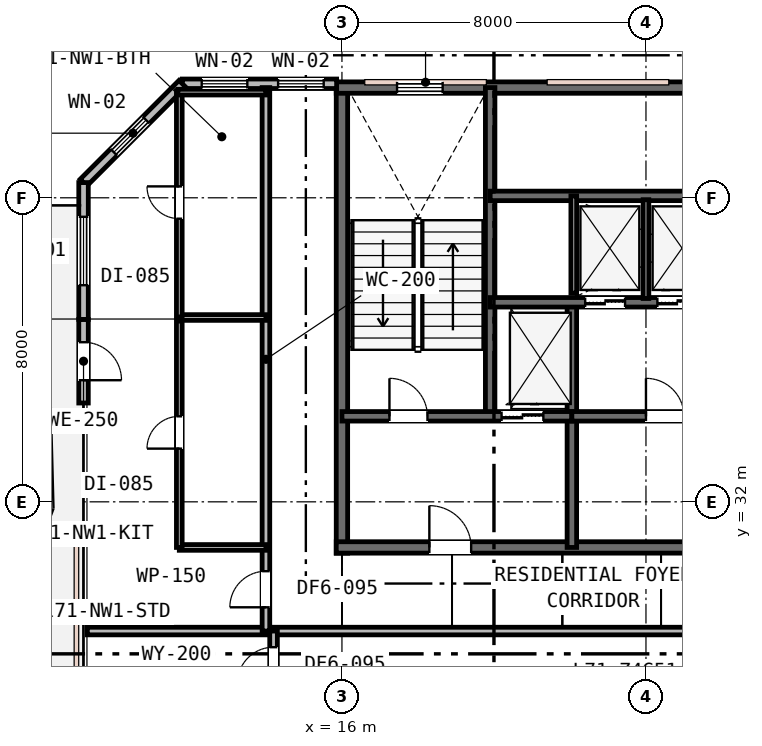
"""IFC4 building model, lengths in metres.
Left out: names, types, materials, properties, quantities, classifications, styles, units other than length and angle.
Written with IfcOpenShell. Run it as: python <this file> out.ifc"""

import sys

from ifc_helpers import new_model, si_unit, direction, frame, frame_2d, origin, place, context, subcontext, project, spatial, rectangle, extrude, element, fill, save


model = new_model("IFC4")
c1 = context("Model", 3, precision=1e-05, world=origin(), true_north=direction((0.0, 1.0)))
c2 = subcontext(c1, "Body", "Model", "MODEL_VIEW")
j1 = project(units=[si_unit("LENGTHUNIT", "METRE"), si_unit("PLANEANGLEUNIT", "RADIAN")], contexts=[c1])
p1 = place(None, origin())
s1 = spatial("IfcSite", under=j1, at=p1, CompositionType="ELEMENT")
p2 = place(p1, origin())
s2 = spatial("IfcBuilding", under=s1, at=p2, CompositionType="ELEMENT")
p3 = place(p2, frame((0.0, 0.0, 275.4)))
s3 = spatial("IfcBuildingStorey", under=s2, at=p3, CompositionType="ELEMENT", Elevation=275.4)
p4 = place(p3, frame((16.0, 30.65, 0.0), z_axis=(0.0, 0.0, 1.0), x_axis=(0.0, 1.0, 0.0)))
e1 = element("IfcWall", 1, at=p4, inside=s3, PredefinedType="SHEAR", context=c2, shape_type="SweptSolid", body=[
    extrude(rectangle(XDim=12.3, YDim=0.3, at=frame_2d((6.15, 0.0))), origin(), (0.0, 0.0, 1.0), 3.8),
])
p5 = place(p3, frame((15.85, 42.9, 0.0), z_axis=(0.0, 0.0, 1.0), x_axis=(1.0, 0.0, 0.0)))
e2 = element("IfcWall", 2, at=p5, inside=s3, PredefinedType="SHEAR", context=c2, shape_type="SweptSolid", body=[
    extrude(rectangle(XDim=24.3, YDim=0.3, at=frame_2d((12.15, 0.0))), origin(), (0.0, 0.0, 1.0), 3.8),
])
p6 = place(p5, frame((1.6, 0.0, 0.95)))
e3 = element("IfcOpeningElement", 3, at=p6, cuts=e2, PredefinedType="OPENING", context=c2, shape_type="SweptSolid", body=[
    extrude(rectangle(XDim=1.2, YDim=1.6, at=frame_2d((0.6, 0.8))), frame((0.0, 0.16, 0.0), z_axis=(0.0, -1.0, 0.0), x_axis=(1.0, 0.0, 0.0)), (0.0, 0.0, 1.0), 0.32),
])
p7 = place(p5, frame((16.5, 0.0, 0.95)))
e4 = element("IfcOpeningElement", 4, at=p7, cuts=e2, PredefinedType="OPENING", context=c2, shape_type="SweptSolid", body=[
    extrude(rectangle(XDim=1.2, YDim=1.6, at=frame_2d((0.6, 0.8))), frame((0.0, 0.16, 0.0), z_axis=(0.0, -1.0, 0.0), x_axis=(1.0, 0.0, 0.0)), (0.0, 0.0, 1.0), 0.32),
])
p8 = place(p5, frame((21.6, 0.0, 0.95)))
e5 = element("IfcOpeningElement", 5, at=p8, cuts=e2, PredefinedType="OPENING", context=c2, shape_type="SweptSolid", body=[
    extrude(rectangle(XDim=1.2, YDim=1.6, at=frame_2d((0.6, 0.8))), frame((0.0, 0.16, 0.0), z_axis=(0.0, -1.0, 0.0), x_axis=(1.0, 0.0, 0.0)), (0.0, 0.0, 1.0), 0.32),
])
p9 = place(p3, frame((15.85, 30.8, 0.0), z_axis=(0.0, 0.0, 1.0), x_axis=(1.0, 0.0, 0.0)))
e6 = element("IfcWall", 6, at=p9, inside=s3, PredefinedType="SHEAR", context=c2, shape_type="SweptSolid", body=[
    extrude(rectangle(XDim=11.2, YDim=0.3, at=frame_2d((5.6, 0.0))), origin(), (0.0, 0.0, 1.0), 3.8),
])
p10 = place(p9, frame((2.45, 0.0, 0.0)))
e7 = element("IfcOpeningElement", 7, at=p10, cuts=e6, PredefinedType="OPENING", context=c2, shape_type="SweptSolid", body=[
    extrude(rectangle(XDim=1.1, YDim=2.15, at=frame_2d((0.55, 1.075))), frame((0.0, 0.16, 0.0), z_axis=(0.0, -1.0, 0.0), x_axis=(1.0, 0.0, 0.0)), (0.0, 0.0, 1.0), 0.32),
])
p11 = place(p3, frame((19.9, 34.25, 0.0), z_axis=(0.0, 0.0, 1.0), x_axis=(0.0, 1.0, 0.0)))
e8 = element("IfcWall", 8, at=p11, inside=s3, PredefinedType="SHEAR", context=c2, shape_type="SweptSolid", body=[
    extrude(rectangle(XDim=8.65, YDim=0.25, at=frame_2d((4.325, 0.0))), origin(), (0.0, 0.0, 1.0), 3.8),
])
p12 = place(p3, frame((22.05, 30.8, 0.0), z_axis=(0.0, 0.0, 1.0), x_axis=(0.0, 1.0, 0.0)))
e9 = element("IfcWall", 9, at=p12, inside=s3, PredefinedType="SHEAR", context=c2, shape_type="SweptSolid", body=[
    extrude(rectangle(XDim=6.45, YDim=0.25, at=frame_2d((3.225, 0.0))), origin(), (0.0, 0.0, 1.0), 3.8),
])
p13 = place(p3, frame((16.0, 34.25, 0.0), z_axis=(0.0, 0.0, 1.0), x_axis=(1.0, 0.0, 0.0)))
e10 = element("IfcWall", 10, at=p13, inside=s3, PredefinedType="SHEAR", context=c2, shape_type="SweptSolid", body=[
    extrude(rectangle(XDim=6.05, YDim=0.25, at=frame_2d((3.025, 0.0))), origin(), (0.0, 0.0, 1.0), 3.8),
])
p14 = place(p13, frame((1.25, 0.0, 0.0)))
e11 = element("IfcOpeningElement", 11, at=p14, cuts=e10, PredefinedType="OPENING", context=c2, shape_type="SweptSolid", body=[
    extrude(rectangle(XDim=1.0, YDim=2.15, at=frame_2d((0.5, 1.075))), frame((0.0, 0.135, 0.0), z_axis=(0.0, -1.0, 0.0), x_axis=(1.0, 0.0, 0.0)), (0.0, 0.0, 1.0), 0.27),
])
p15 = place(p13, frame((4.2, 0.0, 0.0)))
e12 = element("IfcOpeningElement", 12, at=p15, cuts=e10, PredefinedType="OPENING", context=c2, shape_type="SweptSolid", body=[
    extrude(rectangle(XDim=1.1, YDim=2.15, at=frame_2d((0.55, 1.075))), frame((0.0, 0.135, 0.0), z_axis=(0.0, -1.0, 0.0), x_axis=(1.0, 0.0, 0.0)), (0.0, 0.0, 1.0), 0.27),
])
p16 = place(p3, frame((22.05, 34.25, 0.0), z_axis=(0.0, 0.0, 1.0), x_axis=(1.0, 0.0, 0.0)))
e13 = element("IfcWall", 13, at=p16, inside=s3, PredefinedType="SHEAR", context=c2, shape_type="SweptSolid", body=[
    extrude(rectangle(XDim=5.0, YDim=0.25, at=frame_2d((2.5, 0.0))), origin(), (0.0, 0.0, 1.0), 3.8),
])
p17 = place(p16, frame((1.95, 0.0, 0.0)))
e14 = element("IfcOpeningElement", 14, at=p17, cuts=e13, PredefinedType="OPENING", context=c2, shape_type="SweptSolid", body=[
    extrude(rectangle(XDim=1.0, YDim=2.15, at=frame_2d((0.5, 1.075))), frame((0.0, 0.135, 0.0), z_axis=(0.0, -1.0, 0.0), x_axis=(1.0, 0.0, 0.0)), (0.0, 0.0, 1.0), 0.27),
])
p18 = place(p3, frame((19.9, 37.25, 0.0), z_axis=(0.0, 0.0, 1.0), x_axis=(1.0, 0.0, 0.0)))
e15 = element("IfcWall", 15, at=p18, inside=s3, PredefinedType="SHEAR", context=c2, shape_type="SweptSolid", body=[
    extrude(rectangle(XDim=16.2, YDim=0.25, at=frame_2d((8.1, 0.0))), origin(), (0.0, 0.0, 1.0), 3.8),
])
p19 = place(p18, frame((12.55, 0.0, 0.0)))
e16 = element("IfcOpeningElement", 16, at=p19, cuts=e15, PredefinedType="OPENING", context=c2, shape_type="SweptSolid", body=[
    extrude(rectangle(XDim=0.9, YDim=2.15, at=frame_2d((0.45, 1.075))), frame((0.0, 0.135, 0.0), z_axis=(0.0, -1.0, 0.0), x_axis=(1.0, 0.0, 0.0)), (0.0, 0.0, 1.0), 0.27),
])
p20 = place(p18, frame((2.5, 0.0, 0.0)))
e17 = element("IfcOpeningElement", 17, at=p20, cuts=e15, PredefinedType="OPENING", context=c2, shape_type="SweptSolid", body=[
    extrude(rectangle(XDim=1.05, YDim=2.15, at=frame_2d((0.525, 1.075))), frame((0.0, 0.135, 0.0), z_axis=(0.0, -1.0, 0.0), x_axis=(1.0, 0.0, 0.0)), (0.0, 0.0, 1.0), 0.27),
])
p21 = place(p18, frame((4.4, 0.0, 0.0)))
e18 = element("IfcOpeningElement", 18, at=p21, cuts=e15, PredefinedType="OPENING", context=c2, shape_type="SweptSolid", body=[
    extrude(rectangle(XDim=1.05, YDim=2.15, at=frame_2d((0.525, 1.075))), frame((0.0, 0.135, 0.0), z_axis=(0.0, -1.0, 0.0), x_axis=(1.0, 0.0, 0.0)), (0.0, 0.0, 1.0), 0.27),
])
p22 = place(p18, frame((6.3, 0.0, 0.0)))
e19 = element("IfcOpeningElement", 19, at=p22, cuts=e15, PredefinedType="OPENING", context=c2, shape_type="SweptSolid", body=[
    extrude(rectangle(XDim=1.05, YDim=2.15, at=frame_2d((0.525, 1.075))), frame((0.0, 0.135, 0.0), z_axis=(0.0, -1.0, 0.0), x_axis=(1.0, 0.0, 0.0)), (0.0, 0.0, 1.0), 0.27),
])
p23 = place(p3, frame((19.9, 40.05, 0.0), z_axis=(0.0, 0.0, 1.0), x_axis=(1.0, 0.0, 0.0)))
e20 = element("IfcWall", 20, at=p23, inside=s3, PredefinedType="SHEAR", context=c2, shape_type="SweptSolid", body=[
    extrude(rectangle(XDim=12.05, YDim=0.25, at=frame_2d((6.025, 0.0))), origin(), (0.0, 0.0, 1.0), 3.8),
])
p24 = place(p3, frame((15.86, 43.0, 0.0), z_axis=(0.0, 0.0, 1.0), x_axis=(-1.0, 0.0, 0.0)))
e21 = element("IfcWall", 21, at=p24, inside=s3, PredefinedType="STANDARD", context=c2, shape_type="SweptSolid", body=[
    extrude(rectangle(XDim=4.06, YDim=0.25, at=frame_2d((2.03, 0.0))), origin(), (0.0, 0.0, 1.0), 3.53),
])
p25 = place(p24, frame((0.34, 0.0, 0.85)))
e22 = element("IfcOpeningElement", 22, at=p25, cuts=e21, PredefinedType="OPENING", context=c2, shape_type="SweptSolid", body=[
    extrude(rectangle(XDim=1.2, YDim=1.6, at=frame_2d((0.6, 0.8))), frame((0.0, 0.135, 0.0), z_axis=(0.0, -1.0, 0.0), x_axis=(1.0, 0.0, 0.0)), (0.0, 0.0, 1.0), 0.27),
])
p26 = place(p24, frame((2.35, 0.0, 0.85)))
e23 = element("IfcOpeningElement", 23, at=p26, cuts=e21, PredefinedType="OPENING", context=c2, shape_type="SweptSolid", body=[
    extrude(rectangle(XDim=1.2, YDim=1.6, at=frame_2d((0.6, 0.8))), frame((0.0, 0.135, 0.0), z_axis=(0.0, -1.0, 0.0), x_axis=(1.0, 0.0, 0.0)), (0.0, 0.0, 1.0), 0.27),
])
p27 = place(p3, frame((11.8, 43.0, 0.0), z_axis=(0.0, 0.0, 1.0), x_axis=(-0.707106781187, -0.707106781187, 0.0)))
e24 = element("IfcWall", 24, at=p27, inside=s3, PredefinedType="STANDARD", context=c2, shape_type="SweptSolid", body=[
    extrude(rectangle(XDim=3.677, YDim=0.25, at=frame_2d((1.839, 0.0))), origin(), (0.0, 0.0, 1.0), 3.53),
])
p28 = place(p27, frame((1.349, 0.0, 0.85)))
e25 = element("IfcOpeningElement", 25, at=p28, cuts=e24, PredefinedType="OPENING", context=c2, shape_type="SweptSolid", body=[
    extrude(rectangle(XDim=1.2, YDim=1.6, at=frame_2d((0.6, 0.8))), frame((0.0, 0.135, 0.0), z_axis=(0.0, -1.0, 0.0), x_axis=(1.0, 0.0, 0.0)), (0.0, 0.0, 1.0), 0.27),
])
p29 = place(p3, frame((9.2, 36.8, 0.0), z_axis=(0.0, 0.0, 1.0), x_axis=(0.0, -1.0, 0.0)))
e26 = element("IfcWall", 26, at=p29, inside=s3, PredefinedType="STANDARD", context=c2, shape_type="SweptSolid", body=[
    extrude(rectangle(XDim=2.2, YDim=0.25, at=frame_2d((1.1, 0.0))), origin(), (0.0, 0.0, 1.0), 3.53),
])
p30 = place(p29, frame((0.6, 0.0, 0.0)))
e27 = element("IfcOpeningElement", 27, at=p30, cuts=e26, PredefinedType="OPENING", context=c2, shape_type="SweptSolid", body=[
    extrude(rectangle(XDim=1.0, YDim=2.15, at=frame_2d((0.5, 1.075))), frame((0.0, 0.135, 0.0), z_axis=(0.0, -1.0, 0.0), x_axis=(1.0, 0.0, 0.0)), (0.0, 0.0, 1.0), 0.27),
])
p31 = place(p3, frame((9.2, 40.4, 0.0), z_axis=(0.0, 0.0, 1.0), x_axis=(0.0, -1.0, 0.0)))
e28 = element("IfcWall", 28, at=p31, inside=s3, PredefinedType="STANDARD", context=c2, shape_type="SweptSolid", body=[
    extrude(rectangle(XDim=3.6, YDim=0.25, at=frame_2d((1.8, 0.0))), origin(), (0.0, 0.0, 1.0), 3.53),
])
p32 = place(p31, frame((0.9, 0.0, 0.75)))
e29 = element("IfcOpeningElement", 29, at=p32, cuts=e28, PredefinedType="OPENING", context=c2, shape_type="SweptSolid", body=[
    extrude(rectangle(XDim=1.8, YDim=1.85, at=frame_2d((0.9, 0.925))), frame((0.0, 0.135, 0.0), z_axis=(0.0, -1.0, 0.0), x_axis=(1.0, 0.0, 0.0)), (0.0, 0.0, 1.0), 0.27),
])
p33 = place(p3, frame((22.1, 37.49, 0.0), z_axis=(0.0, 0.0, 1.0), x_axis=(0.0, 1.0, 0.0)))
e30 = element("IfcWall", 30, at=p33, inside=s3, PredefinedType="PLUMBINGWALL", context=c2, shape_type="SweptSolid", body=[
    extrude(rectangle(XDim=2.56, YDim=0.15, at=frame_2d((1.28, 0.0))), origin(), (0.0, 0.0, 1.0), 3.53),
])
p34 = place(p3, frame((24.0, 37.35, 0.0), z_axis=(0.0, 0.0, 1.0), x_axis=(0.0, 1.0, 0.0)))
e31 = element("IfcWall", 31, at=p34, inside=s3, PredefinedType="PLUMBINGWALL", context=c2, shape_type="SweptSolid", body=[
    extrude(rectangle(XDim=2.6, YDim=0.15, at=frame_2d((1.3, 0.0))), origin(), (0.0, 0.0, 1.0), 3.53),
])
p35 = place(p3, frame((9.3, 28.6, 0.0), z_axis=(0.0, 0.0, 1.0), x_axis=(1.0, 0.0, 0.0)))
e32 = element("IfcWall", 32, at=p35, inside=s3, PredefinedType="PARTITIONING", context=c2, shape_type="SweptSolid", body=[
    extrude(rectangle(XDim=4.7, YDim=0.2, at=frame_2d((2.35, 0.0))), origin(), (0.0, 0.0, 1.0), 3.53),
])
p36 = place(p3, frame((14.2, 28.6, 0.0), z_axis=(0.0, 0.0, 1.0), x_axis=(1.0, 0.0, 0.0)))
e33 = element("IfcWall", 33, at=p36, inside=s3, PredefinedType="PARTITIONING", context=c2, shape_type="SweptSolid", body=[
    extrude(rectangle(XDim=31.7, YDim=0.2, at=frame_2d((15.85, 0.0))), origin(), (0.0, 0.0, 1.0), 3.16),
])
p37 = place(p36, frame((12.625, 0.0, 0.0)))
e34 = element("IfcOpeningElement", 34, at=p37, cuts=e33, PredefinedType="OPENING", context=c2, shape_type="SweptSolid", body=[
    extrude(rectangle(XDim=0.95, YDim=2.15, at=frame_2d((0.475, 1.075))), frame((0.0, 0.11, 0.0), z_axis=(0.0, -1.0, 0.0), x_axis=(1.0, 0.0, 0.0)), (0.0, 0.0, 1.0), 0.22),
])
p38 = place(p36, frame((19.125, 0.0, 0.0)))
e35 = element("IfcOpeningElement", 35, at=p38, cuts=e33, PredefinedType="OPENING", context=c2, shape_type="SweptSolid", body=[
    extrude(rectangle(XDim=0.95, YDim=2.15, at=frame_2d((0.475, 1.075))), frame((0.0, 0.11, 0.0), z_axis=(0.0, -1.0, 0.0), x_axis=(1.0, 0.0, 0.0)), (0.0, 0.0, 1.0), 0.22),
])
p39 = place(p36, frame((24.016, 0.0, 0.0)))
e36 = element("IfcOpeningElement", 36, at=p39, cuts=e33, PredefinedType="OPENING", context=c2, shape_type="SweptSolid", body=[
    extrude(rectangle(XDim=0.95, YDim=2.15, at=frame_2d((0.475, 1.075))), frame((0.0, 0.11, 0.0), z_axis=(0.0, -1.0, 0.0), x_axis=(1.0, 0.0, 0.0)), (0.0, 0.0, 1.0), 0.22),
])
p40 = place(p3, frame((14.0, 28.6, 0.0), z_axis=(0.0, 0.0, 1.0), x_axis=(0.0, 1.0, 0.0)))
e37 = element("IfcWall", 37, at=p40, inside=s3, PredefinedType="PARTITIONING", context=c2, shape_type="SweptSolid", body=[
    extrude(rectangle(XDim=14.3, YDim=0.2, at=frame_2d((7.15, 0.0))), origin(), (0.0, 0.0, 1.0), 3.53),
])
p41 = place(p40, frame((0.625, 0.0, 0.0)))
e38 = element("IfcOpeningElement", 38, at=p41, cuts=e37, PredefinedType="OPENING", context=c2, shape_type="SweptSolid", body=[
    extrude(rectangle(XDim=0.95, YDim=2.15, at=frame_2d((0.475, 1.075))), frame((0.0, 0.11, 0.0), z_axis=(0.0, -1.0, 0.0), x_axis=(1.0, 0.0, 0.0)), (0.0, 0.0, 1.0), 0.22),
])
for number, where, z_axis, x_axis in (
    (39, (11.72, 30.8, 0.0), (0.0, 0.0, 1.0), (1.0, 0.0, 0.0)),
    (40, (11.72, 36.85, 0.0), (0.0, 0.0, 1.0), (1.0, 0.0, 0.0)),
):
    element("IfcWall", number, at=place(p3, frame(where, z_axis=z_axis, x_axis=x_axis)), inside=s3, PredefinedType="PARTITIONING", context=c2, shape_type="SweptSolid", body=[
        extrude(rectangle(XDim=2.28, YDim=0.15, at=frame_2d((1.14, 0.0))), origin(), (0.0, 0.0, 1.0), 3.53),
    ])
p42 = place(p3, frame((11.72, 30.8, 0.0), z_axis=(0.0, 0.0, 1.0), x_axis=(0.0, 1.0, 0.0)))
e41 = element("IfcWall", 41, at=p42, inside=s3, PredefinedType="PARTITIONING", context=c2, shape_type="SweptSolid", body=[
    extrude(rectangle(XDim=12.02, YDim=0.15, at=frame_2d((6.01, 0.0))), origin(), (0.0, 0.0, 1.0), 3.53),
])
p43 = place(p42, frame((2.6, 0.0, 0.0)))
e42 = element("IfcOpeningElement", 42, at=p43, cuts=e41, PredefinedType="OPENING", context=c2, shape_type="SweptSolid", body=[
    extrude(rectangle(XDim=0.85, YDim=2.15, at=frame_2d((0.425, 1.075))), frame((0.0, 0.085, 0.0), z_axis=(0.0, -1.0, 0.0), x_axis=(1.0, 0.0, 0.0)), (0.0, 0.0, 1.0), 0.17),
])
p44 = place(p42, frame((8.65, 0.0, 0.0)))
e43 = element("IfcOpeningElement", 43, at=p44, cuts=e41, PredefinedType="OPENING", context=c2, shape_type="SweptSolid", body=[
    extrude(rectangle(XDim=0.85, YDim=2.15, at=frame_2d((0.425, 1.075))), frame((0.0, 0.085, 0.0), z_axis=(0.0, -1.0, 0.0), x_axis=(1.0, 0.0, 0.0)), (0.0, 0.0, 1.0), 0.17),
])
p45 = place(p3, frame((11.68, 42.78, 0.0), z_axis=(0.0, 0.0, 1.0), x_axis=(1.0, 0.0, 0.0)))
e44 = element("IfcWall", 44, at=p45, inside=s3, PredefinedType="PARTITIONING", context=c2, shape_type="SweptSolid", body=[
    extrude(rectangle(XDim=2.32, YDim=0.15, at=frame_2d((1.16, 0.0))), origin(), (0.0, 0.0, 1.0), 3.53),
])
p46 = place(p3, frame((14.2, 17.0, 0.0), z_axis=(0.0, 0.0, 1.0), x_axis=(0.0, 1.0, 0.0)))
e45 = element("IfcWall", 45, at=p46, inside=s3, PredefinedType="PARTITIONING", context=c2, shape_type="SweptSolid", body=[
    extrude(rectangle(XDim=11.6, YDim=0.2, at=frame_2d((5.8, 0.0))), origin(), (0.0, 0.0, 1.0), 3.53),
])
p47 = place(p46, frame((10.225, 0.0, 0.0)))
e46 = element("IfcOpeningElement", 46, at=p47, cuts=e45, PredefinedType="OPENING", context=c2, shape_type="SweptSolid", body=[
    extrude(rectangle(XDim=0.95, YDim=2.15, at=frame_2d((0.475, 1.075))), frame((0.0, 0.11, 0.0), z_axis=(0.0, -1.0, 0.0), x_axis=(1.0, 0.0, 0.0)), (0.0, 0.0, 1.0), 0.22),
])
p48 = place(p6, origin())
e47 = element("IfcWindow", 47, at=p48, inside=s3, PartitioningType="SINGLE_PANEL", PredefinedType="WINDOW", context=c2, shape_type="SweptSolid", body=[
    extrude(rectangle(XDim=1.2, YDim=1.6, at=frame_2d((0.6, 0.8))), frame((0.0, 0.03, 0.0), z_axis=(0.0, -1.0, 0.0), x_axis=(1.0, 0.0, 0.0)), (0.0, 0.0, 1.0), 0.06),
])
fill(e3, e47)
p49 = place(p25, origin())
e48 = element("IfcWindow", 48, at=p49, inside=s3, PartitioningType="SINGLE_PANEL", PredefinedType="WINDOW", context=c2, shape_type="SweptSolid", body=[
    extrude(rectangle(XDim=1.2, YDim=1.6, at=frame_2d((0.6, 0.8))), frame((0.0, 0.03, 0.0), z_axis=(0.0, -1.0, 0.0), x_axis=(1.0, 0.0, 0.0)), (0.0, 0.0, 1.0), 0.06),
])
fill(e22, e48)
p50 = place(p26, origin())
e49 = element("IfcWindow", 49, at=p50, inside=s3, PartitioningType="SINGLE_PANEL", PredefinedType="WINDOW", context=c2, shape_type="SweptSolid", body=[
    extrude(rectangle(XDim=1.2, YDim=1.6, at=frame_2d((0.6, 0.8))), frame((0.0, 0.03, 0.0), z_axis=(0.0, -1.0, 0.0), x_axis=(1.0, 0.0, 0.0)), (0.0, 0.0, 1.0), 0.06),
])
fill(e23, e49)
p51 = place(p28, origin())
e50 = element("IfcWindow", 50, at=p51, inside=s3, PartitioningType="SINGLE_PANEL", PredefinedType="WINDOW", context=c2, shape_type="SweptSolid", body=[
    extrude(rectangle(XDim=1.2, YDim=1.6, at=frame_2d((0.6, 0.8))), frame((0.0, 0.03, 0.0), z_axis=(0.0, -1.0, 0.0), x_axis=(1.0, 0.0, 0.0)), (0.0, 0.0, 1.0), 0.06),
])
fill(e25, e50)
p52 = place(p30, origin())
e51 = element("IfcDoor", 51, at=p52, inside=s3, OperationType="SINGLE_SWING_RIGHT", PredefinedType="DOOR", context=c2, shape_type="SweptSolid", body=[
    extrude(rectangle(XDim=1.0, YDim=2.15, at=frame_2d((0.5, 1.075))), frame((0.0, 0.025, 0.0), z_axis=(0.0, -1.0, 0.0), x_axis=(1.0, 0.0, 0.0)), (0.0, 0.0, 1.0), 0.05),
])
fill(e27, e51)
p53 = place(p32, origin())
e52 = element("IfcWindow", 52, at=p53, inside=s3, PartitioningType="SINGLE_PANEL", PredefinedType="WINDOW", context=c2, shape_type="SweptSolid", body=[
    extrude(rectangle(XDim=1.8, YDim=1.85, at=frame_2d((0.9, 0.925))), frame((0.0, 0.03, 0.0), z_axis=(0.0, -1.0, 0.0), x_axis=(1.0, 0.0, 0.0)), (0.0, 0.0, 1.0), 0.06),
])
fill(e29, e52)
p54 = place(p14, origin())
e53 = element("IfcDoor", 53, at=p54, inside=s3, OperationType="SINGLE_SWING_LEFT", PredefinedType="DOOR", context=c2, shape_type="SweptSolid", body=[
    extrude(rectangle(XDim=1.0, YDim=2.15, at=frame_2d((0.5, 1.075))), frame((0.0, 0.025, 0.0), z_axis=(0.0, -1.0, 0.0), x_axis=(1.0, 0.0, 0.0)), (0.0, 0.0, 1.0), 0.05),
])
fill(e11, e53)
p55 = place(p10, origin())
e54 = element("IfcDoor", 54, at=p55, inside=s3, OperationType="SINGLE_SWING_LEFT", PredefinedType="DOOR", context=c2, shape_type="SweptSolid", body=[
    extrude(rectangle(XDim=1.1, YDim=2.15, at=frame_2d((0.55, 1.075))), frame((0.0, 0.025, 0.0), z_axis=(0.0, -1.0, 0.0), x_axis=(1.0, 0.0, 0.0)), (0.0, 0.0, 1.0), 0.05),
])
fill(e7, e54)
p56 = place(p17, origin())
e55 = element("IfcDoor", 55, at=p56, inside=s3, OperationType="SINGLE_SWING_LEFT", PredefinedType="DOOR", context=c2, shape_type="SweptSolid", body=[
    extrude(rectangle(XDim=1.0, YDim=2.15, at=frame_2d((0.5, 1.075))), frame((0.0, 0.025, 0.0), z_axis=(0.0, -1.0, 0.0), x_axis=(1.0, 0.0, 0.0)), (0.0, 0.0, 1.0), 0.05),
])
fill(e14, e55)
p57 = place(p41, origin())
e56 = element("IfcDoor", 56, at=p57, inside=s3, OperationType="SINGLE_SWING_LEFT", PredefinedType="DOOR", context=c2, shape_type="SweptSolid", body=[
    extrude(rectangle(XDim=0.95, YDim=2.15, at=frame_2d((0.475, 1.075))), frame((0.0, 0.025, 0.0), z_axis=(0.0, -1.0, 0.0), x_axis=(1.0, 0.0, 0.0)), (0.0, 0.0, 1.0), 0.05),
])
fill(e38, e56)
p58 = place(p43, origin())
e57 = element("IfcDoor", 57, at=p58, inside=s3, OperationType="SINGLE_SWING_LEFT", PredefinedType="DOOR", context=c2, shape_type="SweptSolid", body=[
    extrude(rectangle(XDim=0.85, YDim=2.15, at=frame_2d((0.425, 1.075))), frame((0.0, 0.025, 0.0), z_axis=(0.0, -1.0, 0.0), x_axis=(1.0, 0.0, 0.0)), (0.0, 0.0, 1.0), 0.05),
])
fill(e42, e57)
p59 = place(p44, origin())
e58 = element("IfcDoor", 58, at=p59, inside=s3, OperationType="SINGLE_SWING_RIGHT", PredefinedType="DOOR", context=c2, shape_type="SweptSolid", body=[
    extrude(rectangle(XDim=0.85, YDim=2.15, at=frame_2d((0.425, 1.075))), frame((0.0, 0.025, 0.0), z_axis=(0.0, -1.0, 0.0), x_axis=(1.0, 0.0, 0.0)), (0.0, 0.0, 1.0), 0.05),
])
fill(e43, e58)
p60 = place(p47, origin())
e59 = element("IfcDoor", 59, at=p60, inside=s3, OperationType="SINGLE_SWING_LEFT", PredefinedType="DOOR", context=c2, shape_type="SweptSolid", body=[
    extrude(rectangle(XDim=0.95, YDim=2.15, at=frame_2d((0.475, 1.075))), frame((0.0, 0.025, 0.0), z_axis=(0.0, -1.0, 0.0), x_axis=(1.0, 0.0, 0.0)), (0.0, 0.0, 1.0), 0.05),
])
fill(e46, e59)
p61 = place(p15, origin())
e60 = element("IfcDoor", 60, at=p61, inside=s3, OperationType="DOUBLE_DOOR_SLIDING", PredefinedType="DOOR", context=c2, shape_type="SweptSolid", body=[
    extrude(rectangle(XDim=1.1, YDim=2.15, at=frame_2d((0.55, 1.075))), frame((0.0, 0.025, 0.0), z_axis=(0.0, -1.0, 0.0), x_axis=(1.0, 0.0, 0.0)), (0.0, 0.0, 1.0), 0.05),
])
fill(e12, e60)
p62 = place(p20, origin())
e61 = element("IfcDoor", 61, at=p62, inside=s3, OperationType="DOUBLE_DOOR_SLIDING", PredefinedType="DOOR", context=c2, shape_type="SweptSolid", body=[
    extrude(rectangle(XDim=1.05, YDim=2.15, at=frame_2d((0.525, 1.075))), frame((0.0, 0.025, 0.0), z_axis=(0.0, -1.0, 0.0), x_axis=(1.0, 0.0, 0.0)), (0.0, 0.0, 1.0), 0.05),
])
fill(e17, e61)
p63 = place(p21, origin())
e62 = element("IfcDoor", 62, at=p63, inside=s3, OperationType="DOUBLE_DOOR_SLIDING", PredefinedType="DOOR", context=c2, shape_type="SweptSolid", body=[
    extrude(rectangle(XDim=1.05, YDim=2.15, at=frame_2d((0.525, 1.075))), frame((0.0, 0.025, 0.0), z_axis=(0.0, -1.0, 0.0), x_axis=(1.0, 0.0, 0.0)), (0.0, 0.0, 1.0), 0.05),
])
fill(e18, e62)
save(model, sys.argv[1])
